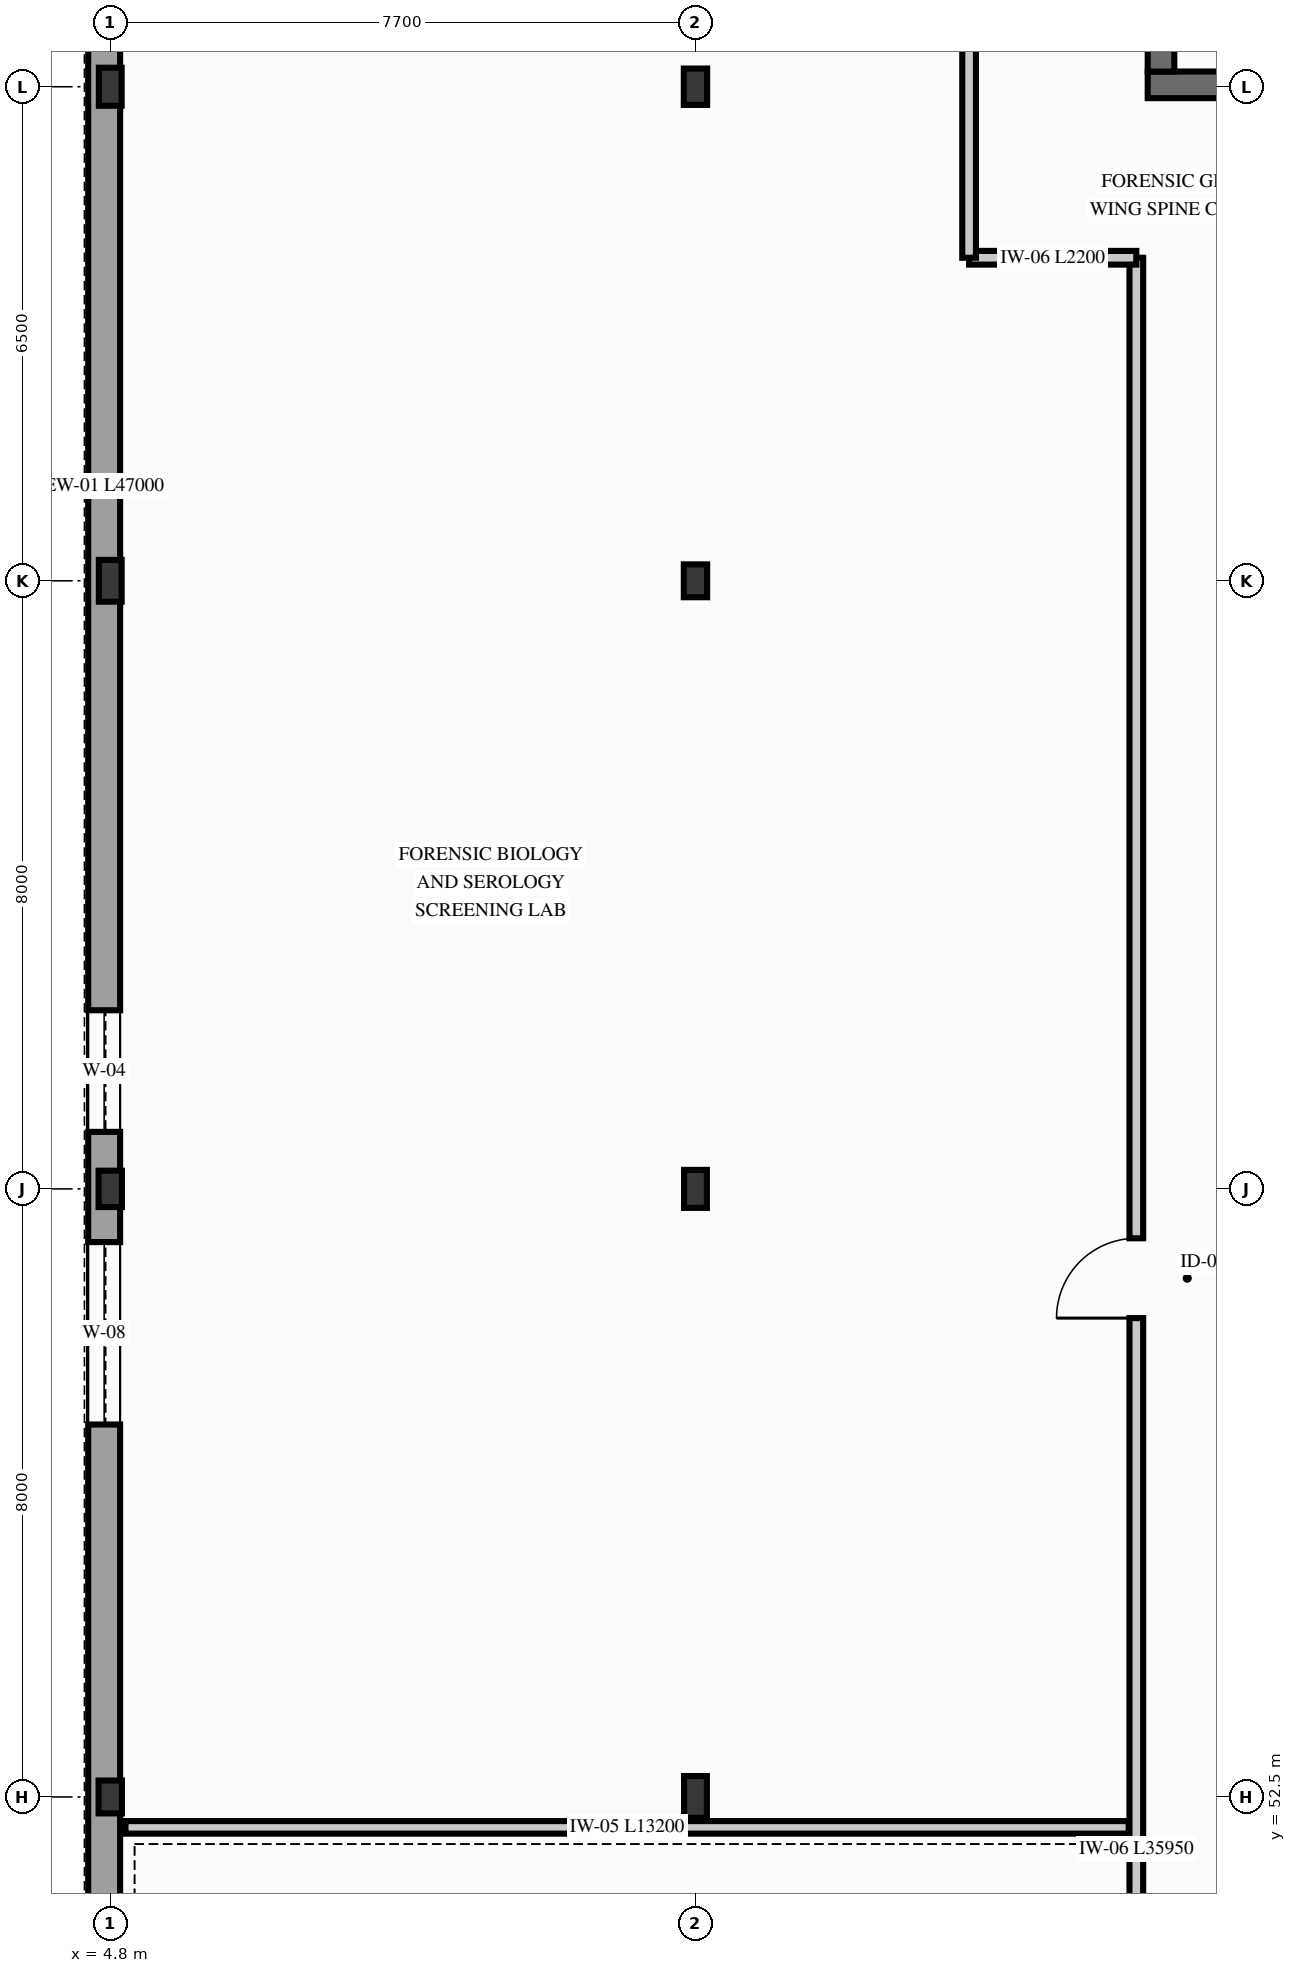
"""IFC4 building model, lengths in metres.
Left out: names, types, materials, properties, quantities, classifications, styles, units other than length and angle.
Written with IfcOpenShell. Run it as: python <this file> out.ifc"""

import sys

from ifc_helpers import new_model, si_unit, direction, frame, frame_2d, origin, origin_2d, place, context, subcontext, project, spatial, rectangle, i_section, extrude, element, fill, save


model = new_model("IFC4")
c1 = context("Model", 3, precision=1e-05, world=origin(), true_north=direction((0.0, 1.0)))
c2 = subcontext(c1, "Body", "Model", "MODEL_VIEW")
j1 = project(units=[si_unit("LENGTHUNIT", "METRE"), si_unit("PLANEANGLEUNIT", "RADIAN")], contexts=[c1])
p1 = place(None, origin())
s1 = spatial("IfcSite", under=j1, at=p1, CompositionType="ELEMENT")
p2 = place(p1, origin())
s2 = spatial("IfcBuilding", under=s1, at=p2, CompositionType="ELEMENT")
p3 = place(p2, frame((0.0, 0.0, 9.3)))
s3 = spatial("IfcBuildingStorey", under=s2, at=p3, CompositionType="ELEMENT", Elevation=9.3)
p4 = place(p3, frame((18.45, 75.025, 0.0), z_axis=(0.0, 0.0, 1.0), x_axis=(1.0, 0.0, 0.0)))
e1 = element("IfcWall", 1, at=p4, inside=s3, PredefinedType="SHEAR", context=c2, shape_type="SweptSolid", body=[
    extrude(rectangle(XDim=8.3, YDim=0.35, at=frame_2d((4.15, 0.0))), origin(), (0.0, 0.0, 1.0), 4.0),
])
p5 = place(p3, frame((18.625, 75.2, 0.0), z_axis=(0.0, 0.0, 1.0), x_axis=(0.0, 1.0, 0.0)))
e2 = element("IfcWall", 2, at=p5, inside=s3, PredefinedType="SHEAR", context=c2, shape_type="SweptSolid", body=[
    extrude(rectangle(XDim=6.8, YDim=0.35, at=frame_2d((3.4, 0.0))), origin(), (0.0, 0.0, 1.0), 4.0),
])
p6 = place(p5, frame((2.6, 0.0, 0.0)))
e3 = element("IfcOpeningElement", 3, at=p6, cuts=e2, PredefinedType="OPENING", context=c2, shape_type="SweptSolid", body=[
    extrude(rectangle(XDim=1.25, YDim=2.2, at=frame_2d((0.625, 1.1))), frame((0.0, 0.185, 0.0), z_axis=(0.0, -1.0, 0.0), x_axis=(1.0, 0.0, 0.0)), (0.0, 0.0, 1.0), 0.37),
])
p7 = place(p3, frame((4.8, 52.5, 0.0), z_axis=(0.0, 0.0, 1.0), x_axis=(1.0, 0.0, 0.0)))
e4 = element("IfcColumn", 4, at=p7, inside=s3, PredefinedType="COLUMN", context=c2, shape_type="SweptSolid", body=[
    extrude(i_section(OverallWidth=0.307, OverallDepth=0.432, WebThickness=0.021, FlangeThickness=0.04, FilletRadius=0.027, at=origin_2d()), origin(), (0.0, 0.0, 1.0), 4.2),
])
p8 = place(p3, frame((4.8, 60.5, 0.0), z_axis=(0.0, 0.0, 1.0), x_axis=(1.0, 0.0, 0.0)))
e5 = element("IfcColumn", 5, at=p8, inside=s3, PredefinedType="COLUMN", context=c2, shape_type="SweptSolid", body=[
    extrude(i_section(OverallWidth=0.307, OverallDepth=0.478, WebThickness=0.021, FlangeThickness=0.04, FilletRadius=0.027, at=origin_2d()), origin(), (0.0, 0.0, 1.0), 4.2),
])
p9 = place(p3, frame((4.8, 68.5, 0.0), z_axis=(0.0, 0.0, 1.0), x_axis=(1.0, 0.0, 0.0)))
e6 = element("IfcColumn", 6, at=p9, inside=s3, PredefinedType="COLUMN", context=c2, shape_type="SweptSolid", body=[
    extrude(i_section(OverallWidth=0.3, OverallDepth=0.55, WebThickness=0.015, FlangeThickness=0.029, FilletRadius=0.027, at=origin_2d()), origin(), (0.0, 0.0, 1.0), 4.2),
])
p10 = place(p3, frame((4.8, 75.0, 0.0), z_axis=(0.0, 0.0, 1.0), x_axis=(1.0, 0.0, 0.0)))
e7 = element("IfcColumn", 7, at=p10, inside=s3, PredefinedType="COLUMN", context=c2, shape_type="SweptSolid", body=[
    extrude(i_section(OverallWidth=0.3, OverallDepth=0.5, WebThickness=0.014, FlangeThickness=0.028, FilletRadius=0.027, at=origin_2d()), origin(), (0.0, 0.0, 1.0), 4.2),
])
p11 = place(p3, frame((12.5, 52.5, 0.0), z_axis=(0.0, 0.0, 1.0), x_axis=(1.0, 0.0, 0.0)))
e8 = element("IfcColumn", 8, at=p11, inside=s3, PredefinedType="COLUMN", context=c2, shape_type="SweptSolid", body=[
    extrude(i_section(OverallWidth=0.3, OverallDepth=0.55, WebThickness=0.015, FlangeThickness=0.029, FilletRadius=0.027, at=origin_2d()), origin(), (0.0, 0.0, 1.0), 4.2),
])
p12 = place(p3, frame((12.5, 60.5, 0.0), z_axis=(0.0, 0.0, 1.0), x_axis=(1.0, 0.0, 0.0)))
e9 = element("IfcColumn", 9, at=p12, inside=s3, PredefinedType="COLUMN", context=c2, shape_type="SweptSolid", body=[
    extrude(i_section(OverallWidth=0.3, OverallDepth=0.5, WebThickness=0.014, FlangeThickness=0.028, FilletRadius=0.027, at=origin_2d()), origin(), (0.0, 0.0, 1.0), 4.2),
])
p13 = place(p3, frame((12.5, 68.5, 0.0), z_axis=(0.0, 0.0, 1.0), x_axis=(1.0, 0.0, 0.0)))
e10 = element("IfcColumn", 10, at=p13, inside=s3, PredefinedType="COLUMN", context=c2, shape_type="SweptSolid", body=[
    extrude(i_section(OverallWidth=0.307, OverallDepth=0.432, WebThickness=0.021, FlangeThickness=0.04, FilletRadius=0.027, at=origin_2d()), origin(), (0.0, 0.0, 1.0), 4.2),
])
p14 = place(p3, frame((12.5, 75.0, 0.0), z_axis=(0.0, 0.0, 1.0), x_axis=(1.0, 0.0, 0.0)))
e11 = element("IfcColumn", 11, at=p14, inside=s3, PredefinedType="COLUMN", context=c2, shape_type="SweptSolid", body=[
    extrude(i_section(OverallWidth=0.307, OverallDepth=0.478, WebThickness=0.021, FlangeThickness=0.04, FilletRadius=0.027, at=origin_2d()), origin(), (0.0, 0.0, 1.0), 4.2),
])
p15 = place(p3, frame((4.72, 36.5, 0.0), z_axis=(0.0, 0.0, 1.0), x_axis=(0.0, 1.0, 0.0)))
e12 = element("IfcWall", 12, at=p15, inside=s3, PredefinedType="SOLIDWALL", context=c2, shape_type="SweptSolid", body=[
    extrude(rectangle(XDim=47.0, YDim=0.42, at=frame_2d((23.5, 0.0))), origin(), (0.0, 0.0, 1.0), 3.68),
])
p16 = place(p15, frame((1.65, 0.0, 0.74)))
e13 = element("IfcOpeningElement", 13, at=p16, cuts=e12, PredefinedType="OPENING", context=c2, shape_type="SweptSolid", body=[
    extrude(rectangle(XDim=1.6, YDim=2.4, at=frame_2d((0.8, 1.2))), frame((0.0, 0.22, 0.0), z_axis=(0.0, -1.0, 0.0), x_axis=(1.0, 0.0, 0.0)), (0.0, 0.0, 1.0), 0.44),
])
p17 = place(p15, frame((5.5, 0.0, 0.74)))
e14 = element("IfcOpeningElement", 14, at=p17, cuts=e12, PredefinedType="OPENING", context=c2, shape_type="SweptSolid", body=[
    extrude(rectangle(XDim=1.8, YDim=2.4, at=frame_2d((0.9, 1.2))), frame((0.0, 0.22, 0.0), z_axis=(0.0, -1.0, 0.0), x_axis=(1.0, 0.0, 0.0)), (0.0, 0.0, 1.0), 0.44),
])
p18 = place(p15, frame((9.35, 0.0, 0.84)))
e15 = element("IfcOpeningElement", 15, at=p18, cuts=e12, PredefinedType="OPENING", context=c2, shape_type="SweptSolid", body=[
    extrude(rectangle(XDim=1.5, YDim=2.3, at=frame_2d((0.75, 1.15))), frame((0.0, 0.22, 0.0), z_axis=(0.0, -1.0, 0.0), x_axis=(1.0, 0.0, 0.0)), (0.0, 0.0, 1.0), 0.44),
])
p19 = place(p15, frame((20.9, 0.0, 0.74)))
e16 = element("IfcOpeningElement", 16, at=p19, cuts=e12, PredefinedType="OPENING", context=c2, shape_type="SweptSolid", body=[
    extrude(rectangle(XDim=2.4, YDim=2.4, at=frame_2d((1.2, 1.2))), frame((0.0, 0.22, 0.0), z_axis=(0.0, -1.0, 0.0), x_axis=(1.0, 0.0, 0.0)), (0.0, 0.0, 1.0), 0.44),
])
p20 = place(p15, frame((24.75, 0.0, 0.74)))
e17 = element("IfcOpeningElement", 17, at=p20, cuts=e12, PredefinedType="OPENING", context=c2, shape_type="SweptSolid", body=[
    extrude(rectangle(XDim=1.6, YDim=2.4, at=frame_2d((0.8, 1.2))), frame((0.0, 0.22, 0.0), z_axis=(0.0, -1.0, 0.0), x_axis=(1.0, 0.0, 0.0)), (0.0, 0.0, 1.0), 0.44),
])
p21 = place(p15, frame((40.15, 0.0, 0.54)))
e18 = element("IfcOpeningElement", 18, at=p21, cuts=e12, PredefinedType="OPENING", context=c2, shape_type="SweptSolid", body=[
    extrude(rectangle(XDim=2.2, YDim=2.6, at=frame_2d((1.1, 1.3))), frame((0.0, 0.22, 0.0), z_axis=(0.0, -1.0, 0.0), x_axis=(1.0, 0.0, 0.0)), (0.0, 0.0, 1.0), 0.44),
])
p22 = place(p3, frame((18.3, 36.8, 0.0), z_axis=(0.0, 0.0, 1.0), x_axis=(0.0, 1.0, 0.0)))
e19 = element("IfcWall", 19, at=p22, inside=s3, PredefinedType="PARTITIONING", context=c2, shape_type="SweptSolid", body=[
    extrude(rectangle(XDim=35.95, YDim=0.18, at=frame_2d((17.975, 0.0))), origin(), (0.0, 0.0, 1.0), 3.678),
])
p23 = place(p22, frame((7.0, 0.0, 0.0)))
e20 = element("IfcOpeningElement", 20, at=p23, cuts=e19, PredefinedType="OPENING", context=c2, shape_type="SweptSolid", body=[
    extrude(rectangle(XDim=1.02, YDim=2.18, at=frame_2d((0.51, 1.09))), frame((0.0, 0.1, 0.0), z_axis=(0.0, -1.0, 0.0), x_axis=(1.0, 0.0, 0.0)), (0.0, 0.0, 1.0), 0.2),
])
p24 = place(p22, frame((22.0, 0.0, 0.0)))
e21 = element("IfcOpeningElement", 21, at=p24, cuts=e19, PredefinedType="OPENING", context=c2, shape_type="SweptSolid", body=[
    extrude(rectangle(XDim=1.05, YDim=2.2, at=frame_2d((0.525, 1.1))), frame((0.0, 0.1, 0.0), z_axis=(0.0, -1.0, 0.0), x_axis=(1.0, 0.0, 0.0)), (0.0, 0.0, 1.0), 0.2),
])
p25 = place(p3, frame((16.1, 72.75, 0.0), z_axis=(0.0, 0.0, 1.0), x_axis=(1.0, 0.0, 0.0)))
e22 = element("IfcWall", 22, at=p25, inside=s3, PredefinedType="PARTITIONING", context=c2, shape_type="SweptSolid", body=[
    extrude(rectangle(XDim=2.2, YDim=0.18, at=frame_2d((1.1, 0.0))), origin(), (0.0, 0.0, 1.0), 3.69),
])
p26 = place(p3, frame((16.1, 72.75, 0.0), z_axis=(0.0, 0.0, 1.0), x_axis=(0.0, 1.0, 0.0)))
e23 = element("IfcWall", 23, at=p26, inside=s3, PredefinedType="PARTITIONING", context=c2, shape_type="SweptSolid", body=[
    extrude(rectangle(XDim=10.3, YDim=0.18, at=frame_2d((5.15, 0.0))), origin(), (0.0, 0.0, 1.0), 3.92),
])
p27 = place(p26, frame((4.5, 0.0, 0.0)))
e24 = element("IfcOpeningElement", 24, at=p27, cuts=e23, PredefinedType="OPENING", context=c2, shape_type="SweptSolid", body=[
    extrude(rectangle(XDim=1.05, YDim=2.2, at=frame_2d((0.525, 1.1))), frame((0.0, 0.1, 0.0), z_axis=(0.0, -1.0, 0.0), x_axis=(1.0, 0.0, 0.0)), (0.0, 0.0, 1.0), 0.2),
])
p28 = place(p3, frame((5.0, 52.1, 0.0), z_axis=(0.0, 0.0, 1.0), x_axis=(1.0, 0.0, 0.0)))
e25 = element("IfcWall", 25, at=p28, inside=s3, PredefinedType="PARTITIONING", context=c2, shape_type="SweptSolid", body=[
    extrude(rectangle(XDim=13.2, YDim=0.165, at=frame_2d((6.6, 0.0))), origin(), (0.0, 0.0, 1.0), 3.548),
])
p29 = place(p19, origin())
e26 = element("IfcWindow", 26, at=p29, inside=s3, PartitioningType="SINGLE_PANEL", PredefinedType="WINDOW", context=c2, shape_type="SweptSolid", body=[
    extrude(rectangle(XDim=2.4, YDim=2.4, at=frame_2d((1.2, 1.2))), frame((0.0, 0.03, 0.0), z_axis=(0.0, -1.0, 0.0), x_axis=(1.0, 0.0, 0.0)), (0.0, 0.0, 1.0), 0.06),
])
fill(e16, e26)
p30 = place(p20, origin())
e27 = element("IfcWindow", 27, at=p30, inside=s3, PartitioningType="SINGLE_PANEL", PredefinedType="WINDOW", context=c2, shape_type="SweptSolid", body=[
    extrude(rectangle(XDim=1.6, YDim=2.4, at=frame_2d((0.8, 1.2))), frame((0.0, 0.03, 0.0), z_axis=(0.0, -1.0, 0.0), x_axis=(1.0, 0.0, 0.0)), (0.0, 0.0, 1.0), 0.06),
])
fill(e17, e27)
p31 = place(p24, origin())
e28 = element("IfcDoor", 28, at=p31, inside=s3, OperationType="SINGLE_SWING_LEFT", PredefinedType="DOOR", context=c2, shape_type="SweptSolid", body=[
    extrude(rectangle(XDim=1.05, YDim=2.2, at=frame_2d((0.525, 1.1))), frame((0.0, 0.025, 0.0), z_axis=(0.0, -1.0, 0.0), x_axis=(1.0, 0.0, 0.0)), (0.0, 0.0, 1.0), 0.05),
])
fill(e21, e28)
save(model, sys.argv[1])
